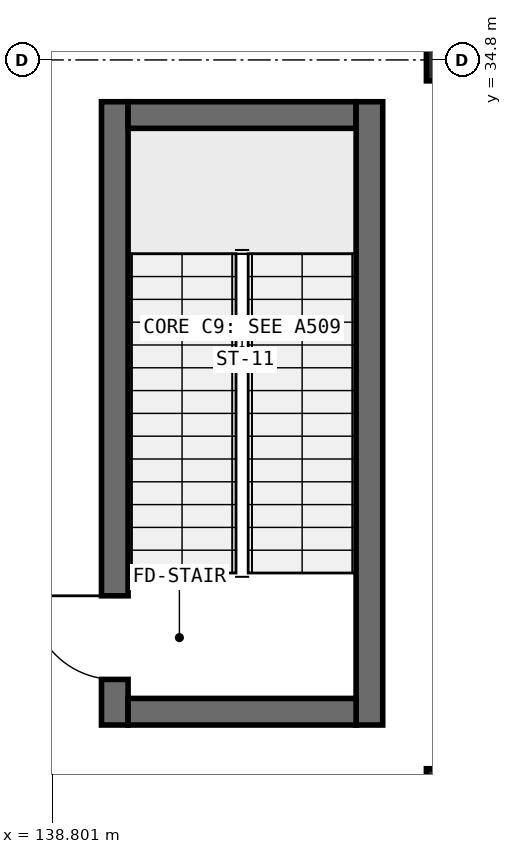
"""IFC4 building model, lengths in metres.
Left out: names, types, materials, properties, quantities, classifications, styles, units other than length and angle.
Written with IfcOpenShell. Run it as: python <this file> out.ifc"""

import sys

from ifc_helpers import new_model, si_unit, direction, frame, frame_2d, origin, origin_2d, place, context, subcontext, project, spatial, rectangle, extrude, element, fill, save


model = new_model("IFC4")
c1 = context("Model", 3, precision=1e-05, world=origin(), true_north=direction((0.0, 1.0)))
c2 = subcontext(c1, "Body", "Model", "MODEL_VIEW")
j1 = project(units=[si_unit("LENGTHUNIT", "METRE"), si_unit("PLANEANGLEUNIT", "RADIAN")], contexts=[c1])
p1 = place(None, origin())
s1 = spatial("IfcSite", under=j1, at=p1, CompositionType="ELEMENT")
p2 = place(p1, origin())
s2 = spatial("IfcBuilding", under=s1, at=p2, CompositionType="ELEMENT")
p3 = place(p2, frame((0.0, 0.0, -5.25)))
s3 = spatial("IfcBuildingStorey", under=s2, at=p3, CompositionType="ELEMENT", Elevation=-5.25)
p4 = place(p3, frame((139.625, 26.05, 0.0), z_axis=(0.0, 0.0, 1.0), x_axis=(0.0, 1.0, 0.0)))
e1 = element("IfcWall", 1, at=p4, inside=s3, PredefinedType="SHEAR", context=c2, shape_type="SweptSolid", body=[
    extrude(rectangle(XDim=8.2, YDim=0.35, at=frame_2d((4.1, 0.0))), origin(), (0.0, 0.0, 1.0), 5.25),
])
p5 = place(p4, frame((0.6, 0.0, 0.0)))
e2 = element("IfcOpeningElement", 2, at=p5, cuts=e1, PredefinedType="OPENING", context=c2, shape_type="SweptSolid", body=[
    extrude(rectangle(XDim=1.1, YDim=2.15, at=frame_2d((0.55, 1.075))), frame((0.0, 0.185, 0.0), z_axis=(0.0, -1.0, 0.0), x_axis=(1.0, 0.0, 0.0)), (0.0, 0.0, 1.0), 0.37),
])
p6 = place(p3, frame((139.8, 34.075, 0.0), z_axis=(0.0, 0.0, 1.0), x_axis=(1.0, 0.0, 0.0)))
e3 = element("IfcWall", 3, at=p6, inside=s3, PredefinedType="SHEAR", context=c2, shape_type="SweptSolid", body=[
    extrude(rectangle(XDim=3.0, YDim=0.35, at=frame_2d((1.5, 0.0))), origin(), (0.0, 0.0, 1.0), 5.25),
])
p7 = place(p3, frame((142.975, 34.25, 0.0), z_axis=(0.0, 0.0, 1.0), x_axis=(0.0, -1.0, 0.0)))
e4 = element("IfcWall", 4, at=p7, inside=s3, PredefinedType="SHEAR", context=c2, shape_type="SweptSolid", body=[
    extrude(rectangle(XDim=8.2, YDim=0.35, at=frame_2d((4.1, 0.0))), origin(), (0.0, 0.0, 1.0), 5.25),
])
p8 = place(p3, frame((142.8, 26.225, 0.0), z_axis=(0.0, 0.0, 1.0), x_axis=(-1.0, 0.0, 0.0)))
e5 = element("IfcWall", 5, at=p8, inside=s3, PredefinedType="SHEAR", context=c2, shape_type="SweptSolid", body=[
    extrude(rectangle(XDim=3.0, YDim=0.35, at=frame_2d((1.5, 0.0))), origin(), (0.0, 0.0, 1.0), 5.25),
])
for number, where, z_axis, x_axis in (
    (6, (144.0, 25.2, 0.0), (0.0, 0.0, 1.0), (1.0, 0.0, 0.0)),
    (7, (144.0, 34.8, 0.0), (0.0, 0.0, 1.0), (1.0, 0.0, 0.0)),
):
    element("IfcColumn", number, at=place(p3, frame(where, z_axis=z_axis, x_axis=x_axis)), inside=s3, PredefinedType="COLUMN", context=c2, shape_type="SweptSolid", body=[
        extrude(rectangle(XDim=0.55, YDim=0.55, at=origin_2d()), origin(), (0.0, 0.0, 1.0), 5.25),
    ])
p9 = place(p5, origin())
e8 = element("IfcDoor", 8, at=p9, inside=s3, OperationType="SINGLE_SWING_RIGHT", PredefinedType="DOOR", context=c2, shape_type="SweptSolid", body=[
    extrude(rectangle(XDim=1.1, YDim=2.15, at=frame_2d((0.55, 1.075))), frame((0.0, 0.025, 0.0), z_axis=(0.0, -1.0, 0.0), x_axis=(1.0, 0.0, 0.0)), (0.0, 0.0, 1.0), 0.05),
])
fill(e2, e8)
save(model, sys.argv[1])
